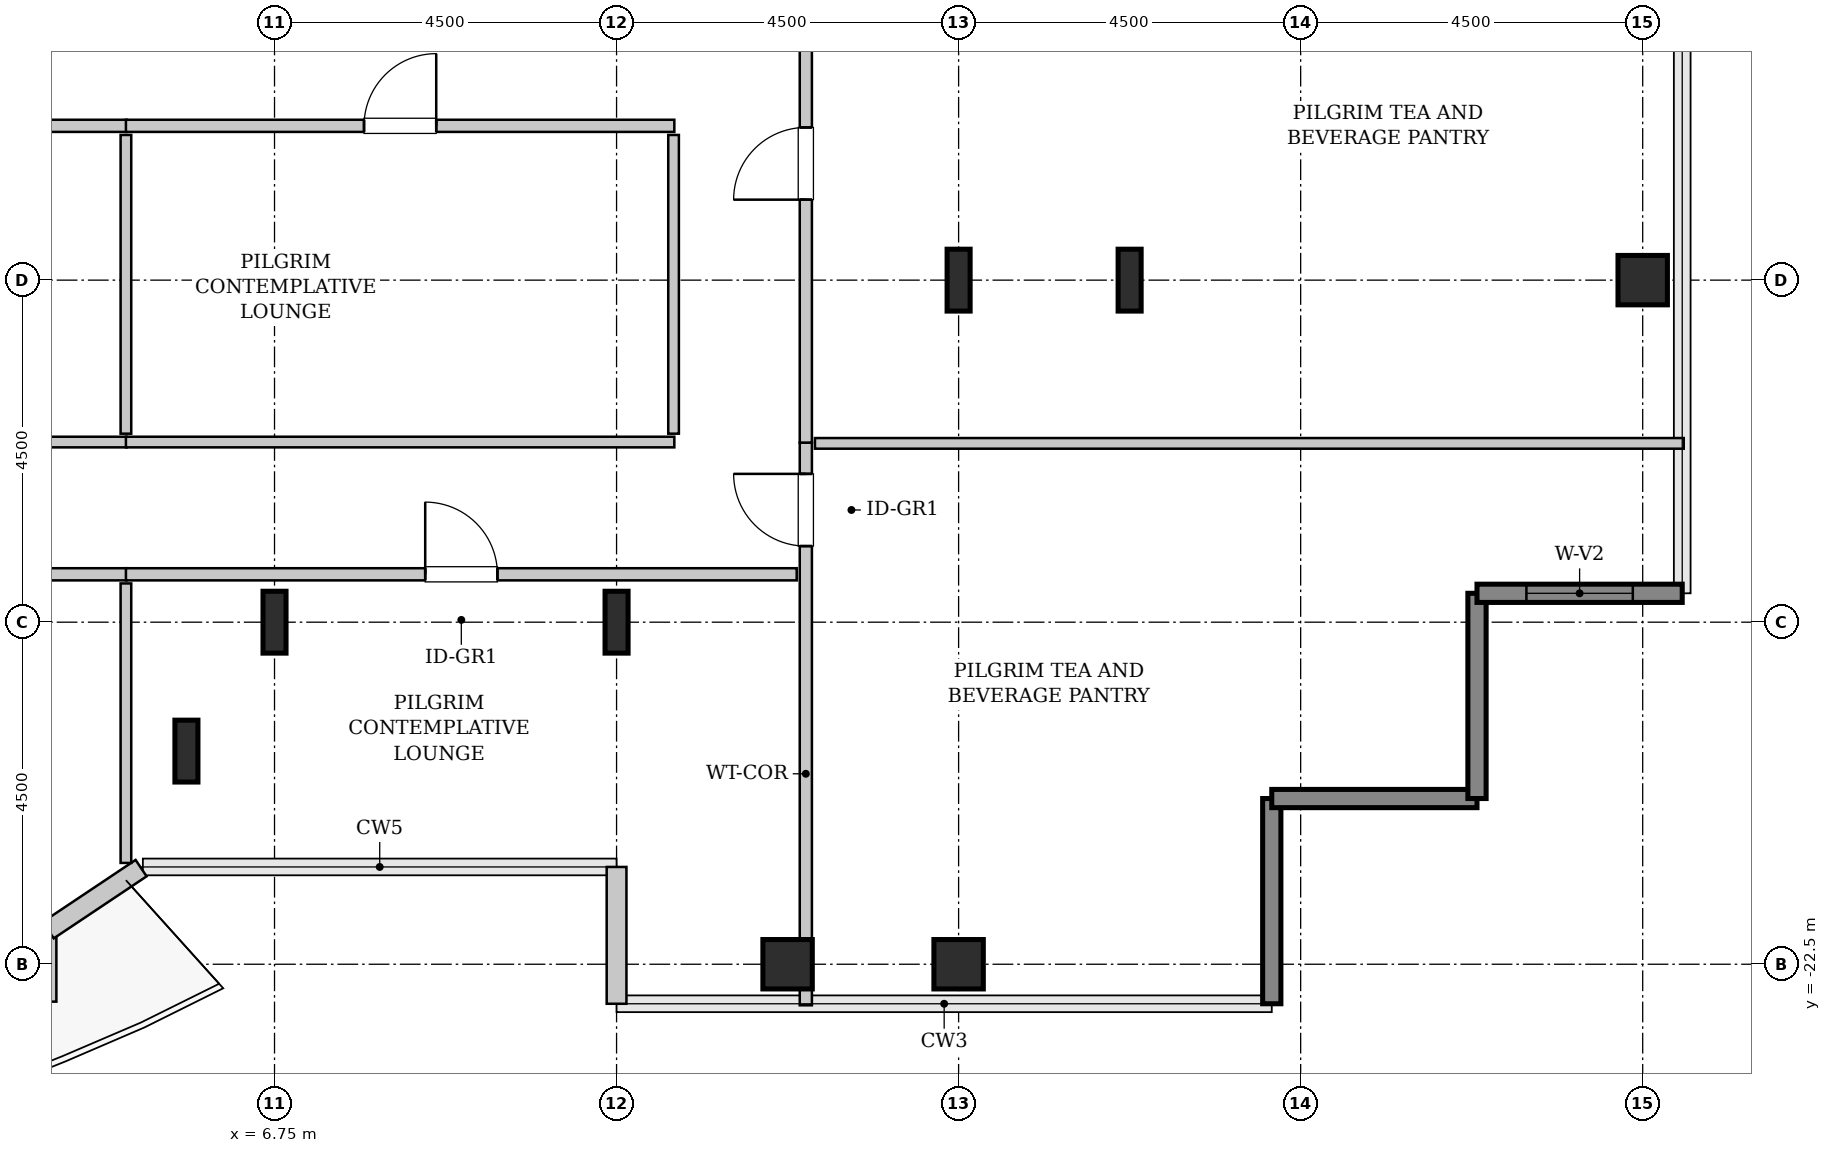
"""IFC4 building model, lengths in metres.
Left out: names, types, materials, properties, quantities, classifications, styles, units other than length and angle.
Written with IfcOpenShell. Run it as: python <this file> out.ifc"""

import sys

from ifc_helpers import new_model, si_unit, direction, frame, frame_2d, origin, origin_2d, place, context, subcontext, project, spatial, rectangle, hollow_rectangle, i_section, extrude, source, transform, mapped, element, fill, save


model = new_model("IFC4")
c1 = context("Model", 3, precision=1e-05, world=origin(), true_north=direction((0.0, 1.0)))
c2 = subcontext(c1, "Body", "Model", "MODEL_VIEW")
j1 = project(units=[si_unit("LENGTHUNIT", "METRE"), si_unit("PLANEANGLEUNIT", "RADIAN")], contexts=[c1])
p1 = place(None, origin())
s1 = spatial("IfcSite", under=j1, at=p1, CompositionType="ELEMENT")
p2 = place(p1, origin())
s2 = spatial("IfcBuilding", under=s1, at=p2, CompositionType="ELEMENT")
p3 = place(p2, frame((0.0, 0.0, 240.8)))
s3 = spatial("IfcBuildingStorey", under=s2, at=p3, CompositionType="ELEMENT", Elevation=240.8)
m1 = source(origin(), c2, "Body", "SweptSolid", [
    extrude(i_section(OverallWidth=0.303, OverallDepth=0.814, WebThickness=0.021, FlangeThickness=0.04, FilletRadius=0.03, at=origin_2d()), origin(), (0.0, 0.0, 1.0), 3.8),
])
for number, where, z_axis, x_axis in (
    (1, (5.591, -19.696, 0.0), (0.0, 0.0, 1.0), (1.0, 0.0, 0.0)),
    (2, (6.75, -18.0, 0.0), (0.0, 0.0, 1.0), (1.0, 0.0, 0.0)),
    (3, (11.25, -18.0, 0.0), (0.0, 0.0, 1.0), (1.0, 0.0, 0.0)),
):
    element("IfcColumn", number, at=place(p3, frame(where, z_axis=z_axis, x_axis=x_axis)), inside=s3, PredefinedType="COLUMN", context=c2, shape_type="MappedRepresentation", body=[
        mapped(m1, transform((0.0, 0.0, 0.0), x_axis=(1.0, 0.0, 0.0), y_axis=(0.0, 1.0, 0.0), z_axis=(0.0, 0.0, 1.0), scale=1.0)),
    ])
m2 = source(origin(), c2, "Body", "SweptSolid", [
    extrude(hollow_rectangle(XDim=0.65, YDim=0.65, WallThickness=0.032, InnerFilletRadius=0.032, OuterFilletRadius=0.064, at=origin_2d()), origin(), (0.0, 0.0, 1.0), 3.8),
])
for number, where, z_axis, x_axis in (
    (4, (13.5, -22.5, 0.0), (0.0, 0.0, 1.0), (1.0, 0.0, 0.0)),
    (5, (15.75, -22.5, 0.0), (0.0, 0.0, 1.0), (1.0, 0.0, 0.0)),
):
    element("IfcColumn", number, at=place(p3, frame(where, z_axis=z_axis, x_axis=x_axis)), inside=s3, PredefinedType="COLUMN", context=c2, shape_type="MappedRepresentation", body=[
        mapped(m2, transform((0.0, 0.0, 0.0), x_axis=(1.0, 0.0, 0.0), y_axis=(0.0, 1.0, 0.0), z_axis=(0.0, 0.0, 1.0), scale=1.0)),
    ])
for number, where, z_axis, x_axis in (
    (6, (15.75, -13.5, 0.0), (0.0, 0.0, 1.0), (1.0, 0.0, 0.0)),
    (7, (18.0, -13.5, 0.0), (0.0, 0.0, 1.0), (1.0, 0.0, 0.0)),
):
    element("IfcColumn", number, at=place(p3, frame(where, z_axis=z_axis, x_axis=x_axis)), inside=s3, PredefinedType="COLUMN", context=c2, shape_type="MappedRepresentation", body=[
        mapped(m1, transform((0.0, 0.0, 0.0), x_axis=(1.0, 0.0, 0.0), y_axis=(0.0, 1.0, 0.0), z_axis=(0.0, 0.0, 1.0), scale=1.0)),
    ])
p4 = place(p3, frame((24.75, -13.5, 0.0), z_axis=(0.0, 0.0, 1.0), x_axis=(1.0, 0.0, 0.0)))
e8 = element("IfcColumn", 8, at=p4, inside=s3, PredefinedType="COLUMN", context=c2, shape_type="MappedRepresentation", body=[
    mapped(m2, transform((0.0, 0.0, 0.0), x_axis=(1.0, 0.0, 0.0), y_axis=(0.0, 1.0, 0.0), z_axis=(0.0, 0.0, 1.0), scale=1.0)),
])
m3 = source(origin(), c2, "Body", "SweptSolid", [
    extrude(rectangle(XDim=1.8, YDim=0.26, at=frame_2d((0.9, 0.0))), origin(), (0.0, 0.0, 1.0), 3.55),
])
p5 = place(p3, frame((11.25, -21.22, 0.0), z_axis=(0.0, 0.0, 1.0), x_axis=(0.0, -1.0, 0.0)))
e9 = element("IfcWall", 9, at=p5, inside=s3, PredefinedType="SOLIDWALL", context=c2, shape_type="MappedRepresentation", body=[
    mapped(m3, transform((0.0, 0.0, 0.0), x_axis=(1.0, 0.0, 0.0), y_axis=(0.0, 1.0, 0.0), z_axis=(0.0, 0.0, 1.0), scale=1.0)),
])
m4 = source(origin(), c2, "Body", "SweptSolid", [
    extrude(rectangle(XDim=2.7, YDim=0.24, at=frame_2d((1.35, 0.0))), origin(), (0.0, 0.0, 1.0), 3.55),
])
for number, where, z_axis, x_axis in (
    (10, (19.87, -23.02, 0.0), (0.0, 0.0, 1.0), (0.0, 1.0, 0.0)),
    (11, (19.87, -20.32, 0.0), (0.0, 0.0, 1.0), (1.0, 0.0, 0.0)),
    (12, (22.57, -20.32, 0.0), (0.0, 0.0, 1.0), (0.0, 1.0, 0.0)),
):
    element("IfcWall", number, at=place(p3, frame(where, z_axis=z_axis, x_axis=x_axis)), inside=s3, PredefinedType="SHEAR", context=c2, shape_type="MappedRepresentation", body=[
        mapped(m4, transform((0.0, 0.0, 0.0), x_axis=(1.0, 0.0, 0.0), y_axis=(0.0, 1.0, 0.0), z_axis=(0.0, 0.0, 1.0), scale=1.0)),
    ])
p6 = place(p3, frame((22.57, -17.62, 0.0), z_axis=(0.0, 0.0, 1.0), x_axis=(1.0, 0.0, 0.0)))
e13 = element("IfcWall", 13, at=p6, inside=s3, PredefinedType="SHEAR", context=c2, shape_type="MappedRepresentation", body=[
    mapped(m4, transform((0.0, 0.0, 0.0), x_axis=(1.0, 0.0, 0.0), y_axis=(0.0, 1.0, 0.0), z_axis=(0.0, 0.0, 1.0), scale=1.0)),
])
p7 = place(p6, frame((0.65, 0.0, 0.85)))
e14 = element("IfcOpeningElement", 14, at=p7, cuts=e13, PredefinedType="OPENING", context=c2, shape_type="SweptSolid", body=[
    extrude(rectangle(XDim=1.4, YDim=1.8, at=frame_2d((0.7, 0.9))), frame((0.0, 0.13, 0.0), z_axis=(0.0, -1.0, 0.0), x_axis=(1.0, 0.0, 0.0)), (0.0, 0.0, 1.0), 0.26),
])
m5 = source(origin(), c2, "Body", "SweptSolid", [
    extrude(rectangle(XDim=0.897, YDim=0.26, at=frame_2d((0.448, 0.0))), origin(), (0.0, 0.0, 1.0), 3.55),
])
p8 = place(p3, frame((3.75, -22.992, 0.0), z_axis=(0.0, 0.0, 1.0), x_axis=(0.0, 1.0, 0.0)))
e15 = element("IfcWall", 15, at=p8, inside=s3, PredefinedType="SOLIDWALL", context=c2, shape_type="MappedRepresentation", body=[
    mapped(m5, transform((0.0, 0.0, 0.0), x_axis=(1.0, 0.0, 0.0), y_axis=(0.0, 1.0, 0.0), z_axis=(0.0, 0.0, 1.0), scale=1.0)),
])
m6 = source(origin(), c2, "Body", "SweptSolid", [
    extrude(rectangle(XDim=1.469, YDim=0.26, at=frame_2d((0.734, 0.0))), origin(), (0.0, 0.0, 1.0), 3.55),
])
p9 = place(p3, frame((3.773, -22.052, 0.0), z_axis=(0.0, 0.0, 1.0), x_axis=(0.831461760506, 0.555581983884, 0.0)))
e16 = element("IfcWall", 16, at=p9, inside=s3, PredefinedType="SOLIDWALL", context=c2, shape_type="MappedRepresentation", body=[
    mapped(m6, transform((0.0, 0.0, 0.0), x_axis=(1.0, 0.0, 0.0), y_axis=(0.0, 1.0, 0.0), z_axis=(0.0, 0.0, 1.0), scale=1.0)),
])
m7 = source(origin(), c2, "Body", "SweptSolid", [
    extrude(rectangle(XDim=7.403, YDim=0.16, at=frame_2d((3.701, 0.0))), origin(), (0.0, 0.0, 1.0), 3.535),
])
p10 = place(p3, frame((13.74, -23.04, 0.0), z_axis=(0.0, 0.0, 1.0), x_axis=(0.0, 1.0, 0.0)))
e17 = element("IfcWall", 17, at=p10, inside=s3, PredefinedType="PARTITIONING", context=c2, shape_type="MappedRepresentation", body=[
    mapped(m7, transform((0.0, 0.0, 0.0), x_axis=(1.0, 0.0, 0.0), y_axis=(0.0, 1.0, 0.0), z_axis=(0.0, 0.0, 1.0), scale=1.0)),
])
p11 = place(p10, frame((6.041, 0.0, 0.0)))
e18 = element("IfcOpeningElement", 18, at=p11, cuts=e17, PredefinedType="OPENING", context=c2, shape_type="SweptSolid", body=[
    extrude(rectangle(XDim=0.95, YDim=2.1, at=frame_2d((0.475, 1.05))), frame((0.0, 0.09, 0.0), z_axis=(0.0, -1.0, 0.0), x_axis=(1.0, 0.0, 0.0)), (0.0, 0.0, 1.0), 0.18),
])
m8 = source(origin(), c2, "Body", "SweptSolid", [
    extrude(rectangle(XDim=11.43, YDim=0.14, at=frame_2d((5.715, 0.0))), origin(), (0.0, 0.0, 1.0), 3.535),
])
p12 = place(p3, frame((13.86, -15.647, 0.0), z_axis=(0.0, 0.0, 1.0), x_axis=(1.0, 0.0, 0.0)))
e19 = element("IfcWall", 19, at=p12, inside=s3, PredefinedType="PARTITIONING", context=c2, shape_type="MappedRepresentation", body=[
    mapped(m8, transform((0.0, 0.0, 0.0), x_axis=(1.0, 0.0, 0.0), y_axis=(0.0, 1.0, 0.0), z_axis=(0.0, 0.0, 1.0), scale=1.0)),
])
m9 = source(origin(), c2, "Body", "SweptSolid", [
    extrude(rectangle(XDim=7.343, YDim=0.16, at=frame_2d((3.671, 0.0))), origin(), (0.0, 0.0, 1.0), 3.535),
])
p13 = place(p3, frame((13.74, -15.637, 0.0), z_axis=(0.0, 0.0, 1.0), x_axis=(0.0, 1.0, 0.0)))
e20 = element("IfcWall", 20, at=p13, inside=s3, PredefinedType="PARTITIONING", context=c2, shape_type="MappedRepresentation", body=[
    mapped(m9, transform((0.0, 0.0, 0.0), x_axis=(1.0, 0.0, 0.0), y_axis=(0.0, 1.0, 0.0), z_axis=(0.0, 0.0, 1.0), scale=1.0)),
])
p14 = place(p13, frame((3.196, 0.0, 0.0)))
e21 = element("IfcOpeningElement", 21, at=p14, cuts=e20, PredefinedType="OPENING", context=c2, shape_type="SweptSolid", body=[
    extrude(rectangle(XDim=0.95, YDim=2.1, at=frame_2d((0.475, 1.05))), frame((0.0, 0.09, 0.0), z_axis=(0.0, -1.0, 0.0), x_axis=(1.0, 0.0, 0.0)), (0.0, 0.0, 1.0), 0.18),
])
m10 = source(origin(), c2, "Body", "SweptSolid", [
    extrude(rectangle(XDim=12.21, YDim=0.16, at=frame_2d((6.105, 0.0))), origin(), (0.0, 0.0, 1.0), 3.535),
])
p15 = place(p3, frame((-7.405, -17.37, 0.0), z_axis=(0.0, 0.0, 1.0), x_axis=(1.0, 0.0, 0.0)))
e22 = element("IfcWall", 22, at=p15, inside=s3, PredefinedType="PARTITIONING", context=c2, shape_type="MappedRepresentation", body=[
    mapped(m10, transform((0.0, 0.0, 0.0), x_axis=(1.0, 0.0, 0.0), y_axis=(0.0, 1.0, 0.0), z_axis=(0.0, 0.0, 1.0), scale=1.0)),
])
p16 = place(p15, frame((5.63, 0.0, 0.0)))
e23 = element("IfcOpeningElement", 23, at=p16, cuts=e22, PredefinedType="OPENING", context=c2, shape_type="SweptSolid", body=[
    extrude(rectangle(XDim=0.95, YDim=2.1, at=frame_2d((0.475, 1.05))), frame((0.0, 0.09, 0.0), z_axis=(0.0, -1.0, 0.0), x_axis=(1.0, 0.0, 0.0)), (0.0, 0.0, 1.0), 0.18),
])
m11 = source(origin(), c2, "Body", "SweptSolid", [
    extrude(rectangle(XDim=3.677, YDim=0.14, at=frame_2d((1.838, 0.0))), origin(), (0.0, 0.0, 1.0), 3.535),
])
p17 = place(p3, frame((4.795, -21.167, 0.0), z_axis=(0.0, 0.0, 1.0), x_axis=(0.0, 1.0, 0.0)))
e24 = element("IfcWall", 24, at=p17, inside=s3, PredefinedType="PARTITIONING", context=c2, shape_type="MappedRepresentation", body=[
    mapped(m11, transform((0.0, 0.0, 0.0), x_axis=(1.0, 0.0, 0.0), y_axis=(0.0, 1.0, 0.0), z_axis=(0.0, 0.0, 1.0), scale=1.0)),
])
p18 = place(p3, frame((-7.405, -11.47, 0.0), z_axis=(0.0, 0.0, 1.0), x_axis=(1.0, 0.0, 0.0)))
e25 = element("IfcWall", 25, at=p18, inside=s3, PredefinedType="PARTITIONING", context=c2, shape_type="MappedRepresentation", body=[
    mapped(m10, transform((0.0, 0.0, 0.0), x_axis=(1.0, 0.0, 0.0), y_axis=(0.0, 1.0, 0.0), z_axis=(0.0, 0.0, 1.0), scale=1.0)),
])
p19 = place(p18, frame((5.63, 0.0, 0.0)))
e26 = element("IfcOpeningElement", 26, at=p19, cuts=e25, PredefinedType="OPENING", context=c2, shape_type="SweptSolid", body=[
    extrude(rectangle(XDim=0.95, YDim=2.1, at=frame_2d((0.475, 1.05))), frame((0.0, 0.09, 0.0), z_axis=(0.0, -1.0, 0.0), x_axis=(1.0, 0.0, 0.0)), (0.0, 0.0, 1.0), 0.18),
])
m12 = source(origin(), c2, "Body", "SweptSolid", [
    extrude(rectangle(XDim=12.21, YDim=0.14, at=frame_2d((6.105, 0.0))), origin(), (0.0, 0.0, 1.0), 3.535),
])
p20 = place(p3, frame((-7.405, -15.63, 0.0), z_axis=(0.0, 0.0, 1.0), x_axis=(1.0, 0.0, 0.0)))
e27 = element("IfcWall", 27, at=p20, inside=s3, PredefinedType="PARTITIONING", context=c2, shape_type="MappedRepresentation", body=[
    mapped(m12, transform((0.0, 0.0, 0.0), x_axis=(1.0, 0.0, 0.0), y_axis=(0.0, 1.0, 0.0), z_axis=(0.0, 0.0, 1.0), scale=1.0)),
])
m13 = source(origin(), c2, "Body", "SweptSolid", [
    extrude(rectangle(XDim=3.93, YDim=0.14, at=frame_2d((1.965, 0.0))), origin(), (0.0, 0.0, 1.0), 3.535),
])
p21 = place(p3, frame((4.795, -15.52, 0.0), z_axis=(0.0, 0.0, 1.0), x_axis=(0.0, 1.0, 0.0)))
e28 = element("IfcWall", 28, at=p21, inside=s3, PredefinedType="PARTITIONING", context=c2, shape_type="MappedRepresentation", body=[
    mapped(m13, transform((0.0, 0.0, 0.0), x_axis=(1.0, 0.0, 0.0), y_axis=(0.0, 1.0, 0.0), z_axis=(0.0, 0.0, 1.0), scale=1.0)),
])
m14 = source(origin(), c2, "Body", "SweptSolid", [
    extrude(rectangle(XDim=8.825, YDim=0.16, at=frame_2d((4.413, 0.0))), origin(), (0.0, 0.0, 1.0), 3.535),
])
p22 = place(p3, frame((4.795, -17.37, 0.0), z_axis=(0.0, 0.0, 1.0), x_axis=(1.0, 0.0, 0.0)))
e29 = element("IfcWall", 29, at=p22, inside=s3, PredefinedType="PARTITIONING", context=c2, shape_type="MappedRepresentation", body=[
    mapped(m14, transform((0.0, 0.0, 0.0), x_axis=(1.0, 0.0, 0.0), y_axis=(0.0, 1.0, 0.0), z_axis=(0.0, 0.0, 1.0), scale=1.0)),
])
p23 = place(p22, frame((3.938, 0.0, 0.0)))
e30 = element("IfcOpeningElement", 30, at=p23, cuts=e29, PredefinedType="OPENING", context=c2, shape_type="SweptSolid", body=[
    extrude(rectangle(XDim=0.95, YDim=2.1, at=frame_2d((0.475, 1.05))), frame((0.0, 0.09, 0.0), z_axis=(0.0, -1.0, 0.0), x_axis=(1.0, 0.0, 0.0)), (0.0, 0.0, 1.0), 0.18),
])
m15 = source(origin(), c2, "Body", "SweptSolid", [
    extrude(rectangle(XDim=7.215, YDim=0.16, at=frame_2d((3.607, 0.0))), origin(), (0.0, 0.0, 1.0), 3.535),
])
p24 = place(p3, frame((4.795, -11.47, 0.0), z_axis=(0.0, 0.0, 1.0), x_axis=(1.0, 0.0, 0.0)))
e31 = element("IfcWall", 31, at=p24, inside=s3, PredefinedType="PARTITIONING", context=c2, shape_type="MappedRepresentation", body=[
    mapped(m15, transform((0.0, 0.0, 0.0), x_axis=(1.0, 0.0, 0.0), y_axis=(0.0, 1.0, 0.0), z_axis=(0.0, 0.0, 1.0), scale=1.0)),
])
p25 = place(p24, frame((3.133, 0.0, 0.0)))
e32 = element("IfcOpeningElement", 32, at=p25, cuts=e31, PredefinedType="OPENING", context=c2, shape_type="SweptSolid", body=[
    extrude(rectangle(XDim=0.95, YDim=2.1, at=frame_2d((0.475, 1.05))), frame((0.0, 0.09, 0.0), z_axis=(0.0, -1.0, 0.0), x_axis=(1.0, 0.0, 0.0)), (0.0, 0.0, 1.0), 0.18),
])
m16 = source(origin(), c2, "Body", "SweptSolid", [
    extrude(rectangle(XDim=7.215, YDim=0.14, at=frame_2d((3.607, 0.0))), origin(), (0.0, 0.0, 1.0), 3.535),
])
p26 = place(p3, frame((4.795, -15.63, 0.0), z_axis=(0.0, 0.0, 1.0), x_axis=(1.0, 0.0, 0.0)))
e33 = element("IfcWall", 33, at=p26, inside=s3, PredefinedType="PARTITIONING", context=c2, shape_type="MappedRepresentation", body=[
    mapped(m16, transform((0.0, 0.0, 0.0), x_axis=(1.0, 0.0, 0.0), y_axis=(0.0, 1.0, 0.0), z_axis=(0.0, 0.0, 1.0), scale=1.0)),
])
p27 = place(p3, frame((12.0, -15.52, 0.0), z_axis=(0.0, 0.0, 1.0), x_axis=(0.0, 1.0, 0.0)))
e34 = element("IfcWall", 34, at=p27, inside=s3, PredefinedType="PARTITIONING", context=c2, shape_type="MappedRepresentation", body=[
    mapped(m13, transform((0.0, 0.0, 0.0), x_axis=(1.0, 0.0, 0.0), y_axis=(0.0, 1.0, 0.0), z_axis=(0.0, 0.0, 1.0), scale=1.0)),
])
m17 = source(origin(), c2, "Body", "SweptSolid", [
    extrude(rectangle(XDim=1.4, YDim=1.8, at=frame_2d((0.7, 0.9))), frame((0.0, 0.03, 0.0), z_axis=(0.0, -1.0, 0.0), x_axis=(1.0, 0.0, 0.0)), (0.0, 0.0, 1.0), 0.06),
])
p28 = place(p7, origin())
e35 = element("IfcWindow", 35, at=p28, inside=s3, PartitioningType="SINGLE_PANEL", PredefinedType="WINDOW", context=c2, shape_type="MappedRepresentation", body=[
    mapped(m17, transform((0.0, 0.0, 0.0), x_axis=(1.0, 0.0, 0.0), y_axis=(0.0, 1.0, 0.0), z_axis=(0.0, 0.0, 1.0), scale=1.0)),
])
fill(e14, e35)
m18 = source(origin(), c2, "Body", "SweptSolid", [
    extrude(rectangle(XDim=0.95, YDim=2.1, at=frame_2d((0.475, 1.05))), frame((0.0, 0.025, 0.0), z_axis=(0.0, -1.0, 0.0), x_axis=(1.0, 0.0, 0.0)), (0.0, 0.0, 1.0), 0.05),
])
p29 = place(p11, origin())
e36 = element("IfcDoor", 36, at=p29, inside=s3, OperationType="SINGLE_SWING_RIGHT", PredefinedType="DOOR", context=c2, shape_type="MappedRepresentation", body=[
    mapped(m18, transform((0.0, 0.0, 0.0), x_axis=(1.0, 0.0, 0.0), y_axis=(0.0, 1.0, 0.0), z_axis=(0.0, 0.0, 1.0), scale=1.0)),
])
fill(e18, e36)
p30 = place(p14, origin())
e37 = element("IfcDoor", 37, at=p30, inside=s3, OperationType="SINGLE_SWING_LEFT", PredefinedType="DOOR", context=c2, shape_type="MappedRepresentation", body=[
    mapped(m18, transform((0.0, 0.0, 0.0), x_axis=(1.0, 0.0, 0.0), y_axis=(0.0, 1.0, 0.0), z_axis=(0.0, 0.0, 1.0), scale=1.0)),
])
fill(e21, e37)
p31 = place(p23, origin())
e38 = element("IfcDoor", 38, at=p31, inside=s3, OperationType="SINGLE_SWING_LEFT", PredefinedType="DOOR", context=c2, shape_type="MappedRepresentation", body=[
    mapped(m18, transform((0.0, 0.0, 0.0), x_axis=(1.0, 0.0, 0.0), y_axis=(0.0, 1.0, 0.0), z_axis=(0.0, 0.0, 1.0), scale=1.0)),
])
fill(e30, e38)
p32 = place(p25, origin())
e39 = element("IfcDoor", 39, at=p32, inside=s3, OperationType="SINGLE_SWING_RIGHT", PredefinedType="DOOR", context=c2, shape_type="MappedRepresentation", body=[
    mapped(m18, transform((0.0, 0.0, 0.0), x_axis=(1.0, 0.0, 0.0), y_axis=(0.0, 1.0, 0.0), z_axis=(0.0, 0.0, 1.0), scale=1.0)),
])
fill(e32, e39)
save(model, sys.argv[1])
